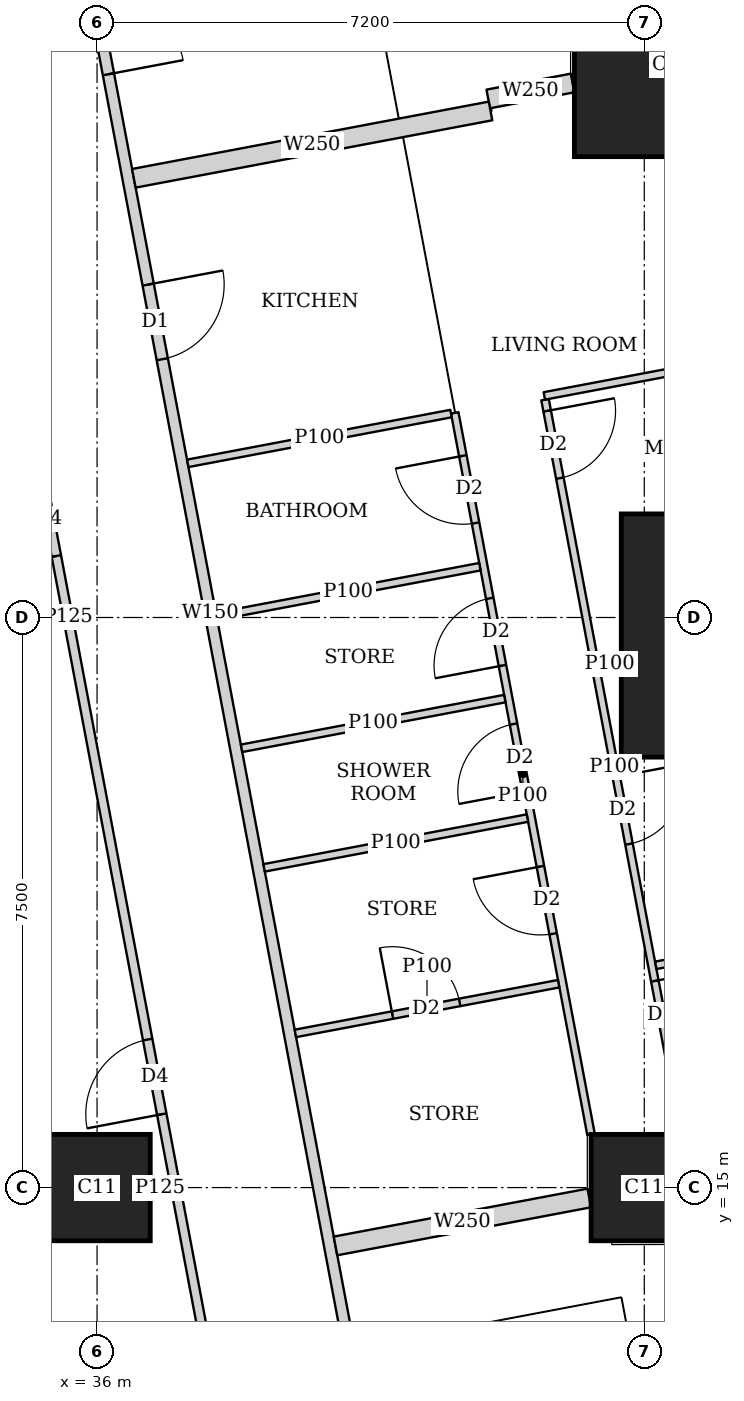
"""IFC4 building model, lengths in metres.
Left out: names, types, materials, properties, quantities, classifications, styles, units other than length and angle.
Written with IfcOpenShell. Run it as: python <this file> out.ifc"""

import sys

from ifc_helpers import new_model, si_unit, direction, frame, frame_2d, origin, origin_2d, place, context, subcontext, project, spatial, rectangle, extrude, element, fill, save


model = new_model("IFC4")
c1 = context("Model", 3, precision=1e-05, world=origin(), true_north=direction((0.0, 1.0)))
c2 = subcontext(c1, "Body", "Model", "MODEL_VIEW")
j1 = project(units=[si_unit("LENGTHUNIT", "METRE"), si_unit("PLANEANGLEUNIT", "RADIAN")], contexts=[c1])
p1 = place(None, origin())
s1 = spatial("IfcSite", under=j1, at=p1, CompositionType="ELEMENT")
p2 = place(p1, origin())
s2 = spatial("IfcBuilding", under=s1, at=p2, CompositionType="ELEMENT")
p3 = place(p2, frame((0.0, 0.0, 212.45)))
s3 = spatial("IfcBuildingStorey", under=s2, at=p3, CompositionType="ELEMENT", Elevation=212.45)
for number, where, z_axis, x_axis in (
    (1, (36.0, 15.0, 0.0), (0.0, 0.0, 1.0), (1.0, 0.0, 0.0)),
    (2, (43.2, 15.0, 0.0), (0.0, 0.0, 1.0), (1.0, 0.0, 0.0)),
):
    element("IfcColumn", number, at=place(p3, frame(where, z_axis=z_axis, x_axis=x_axis)), inside=s3, PredefinedType="COLUMN", context=c2, shape_type="SweptSolid", body=[
        extrude(rectangle(XDim=1.4, YDim=1.4, at=origin_2d()), origin(), (0.0, 0.0, 1.0), 3.75),
    ])
p4 = place(p3, frame((44.697, 22.263, 0.0), z_axis=(0.0, 0.0, 1.0), x_axis=(1.0, 0.0, 0.0)))
e3 = element("IfcColumn", 3, at=p4, inside=s3, PredefinedType="COLUMN", context=c2, shape_type="SweptSolid", body=[
    extrude(rectangle(XDim=3.6, YDim=3.2, at=origin_2d()), origin(), (0.0, 0.0, 1.0), 3.75),
])
p5 = place(p3, frame((43.48, 29.763, 0.0), z_axis=(0.0, 0.0, 1.0), x_axis=(1.0, 0.0, 0.0)))
e4 = element("IfcColumn", 4, at=p5, inside=s3, PredefinedType="COLUMN", context=c2, shape_type="SweptSolid", body=[
    extrude(rectangle(XDim=2.4, YDim=2.4, at=origin_2d()), origin(), (0.0, 0.0, 1.0), 3.75),
])
p6 = place(p3, frame((50.653, 2.703, 0.0), z_axis=(0.0, 0.0, 1.0), x_axis=(-0.185612026696, 0.982623109613, 0.0)))
e5 = element("IfcWall", 5, at=p6, inside=s3, PredefinedType="SOLIDWALL", context=c2, shape_type="SweptSolid", body=[
    extrude(rectangle(XDim=41.393, YDim=0.2, at=frame_2d((20.697, 0.0))), origin(), (0.0, 0.0, 1.0), 3.5),
])
p7 = place(p6, frame((1.633, 0.0, 0.9)))
e6 = element("IfcOpeningElement", 6, at=p7, cuts=e5, PredefinedType="OPENING", context=c2, shape_type="SweptSolid", body=[
    extrude(rectangle(XDim=1.8, YDim=1.5, at=frame_2d((0.9, 0.75))), frame((0.0, 0.11, 0.0), z_axis=(0.0, -1.0, 0.0), x_axis=(1.0, 0.0, 0.0)), (0.0, 0.0, 1.0), 0.22),
])
p8 = place(p6, frame((6.032, 0.0, 0.9)))
e7 = element("IfcOpeningElement", 7, at=p8, cuts=e5, PredefinedType="OPENING", context=c2, shape_type="SweptSolid", body=[
    extrude(rectangle(XDim=1.8, YDim=1.5, at=frame_2d((0.9, 0.75))), frame((0.0, 0.11, 0.0), z_axis=(0.0, -1.0, 0.0), x_axis=(1.0, 0.0, 0.0)), (0.0, 0.0, 1.0), 0.22),
])
p9 = place(p6, frame((9.848, 0.0, 0.9)))
e8 = element("IfcOpeningElement", 8, at=p9, cuts=e5, PredefinedType="OPENING", context=c2, shape_type="SweptSolid", body=[
    extrude(rectangle(XDim=1.8, YDim=1.5, at=frame_2d((0.9, 0.75))), frame((0.0, 0.11, 0.0), z_axis=(0.0, -1.0, 0.0), x_axis=(1.0, 0.0, 0.0)), (0.0, 0.0, 1.0), 0.22),
])
p10 = place(p6, frame((13.664, 0.0, 0.9)))
e9 = element("IfcOpeningElement", 9, at=p10, cuts=e5, PredefinedType="OPENING", context=c2, shape_type="SweptSolid", body=[
    extrude(rectangle(XDim=1.8, YDim=1.5, at=frame_2d((0.9, 0.75))), frame((0.0, 0.11, 0.0), z_axis=(0.0, -1.0, 0.0), x_axis=(1.0, 0.0, 0.0)), (0.0, 0.0, 1.0), 0.22),
])
p11 = place(p6, frame((17.481, 0.0, 0.9)))
e10 = element("IfcOpeningElement", 10, at=p11, cuts=e5, PredefinedType="OPENING", context=c2, shape_type="SweptSolid", body=[
    extrude(rectangle(XDim=1.8, YDim=1.5, at=frame_2d((0.9, 0.75))), frame((0.0, 0.11, 0.0), z_axis=(0.0, -1.0, 0.0), x_axis=(1.0, 0.0, 0.0)), (0.0, 0.0, 1.0), 0.22),
])
p12 = place(p6, frame((21.297, 0.0, 0.9)))
e11 = element("IfcOpeningElement", 11, at=p12, cuts=e5, PredefinedType="OPENING", context=c2, shape_type="SweptSolid", body=[
    extrude(rectangle(XDim=1.8, YDim=1.5, at=frame_2d((0.9, 0.75))), frame((0.0, 0.11, 0.0), z_axis=(0.0, -1.0, 0.0), x_axis=(1.0, 0.0, 0.0)), (0.0, 0.0, 1.0), 0.22),
])
p13 = place(p6, frame((25.113, 0.0, 0.9)))
e12 = element("IfcOpeningElement", 12, at=p13, cuts=e5, PredefinedType="OPENING", context=c2, shape_type="SweptSolid", body=[
    extrude(rectangle(XDim=1.8, YDim=1.5, at=frame_2d((0.9, 0.75))), frame((0.0, 0.11, 0.0), z_axis=(0.0, -1.0, 0.0), x_axis=(1.0, 0.0, 0.0)), (0.0, 0.0, 1.0), 0.22),
])
p14 = place(p6, frame((28.93, 0.0, 0.9)))
e13 = element("IfcOpeningElement", 13, at=p14, cuts=e5, PredefinedType="OPENING", context=c2, shape_type="SweptSolid", body=[
    extrude(rectangle(XDim=1.8, YDim=1.5, at=frame_2d((0.9, 0.75))), frame((0.0, 0.11, 0.0), z_axis=(0.0, -1.0, 0.0), x_axis=(1.0, 0.0, 0.0)), (0.0, 0.0, 1.0), 0.22),
])
p15 = place(p6, frame((32.746, 0.0, 0.9)))
e14 = element("IfcOpeningElement", 14, at=p15, cuts=e5, PredefinedType="OPENING", context=c2, shape_type="SweptSolid", body=[
    extrude(rectangle(XDim=1.8, YDim=1.5, at=frame_2d((0.9, 0.75))), frame((0.0, 0.11, 0.0), z_axis=(0.0, -1.0, 0.0), x_axis=(1.0, 0.0, 0.0)), (0.0, 0.0, 1.0), 0.22),
])
p16 = place(p6, frame((36.481, 0.0, 0.9)))
e15 = element("IfcOpeningElement", 15, at=p16, cuts=e5, PredefinedType="OPENING", context=c2, shape_type="SweptSolid", body=[
    extrude(rectangle(XDim=1.8, YDim=1.5, at=frame_2d((0.9, 0.75))), frame((0.0, 0.11, 0.0), z_axis=(0.0, -1.0, 0.0), x_axis=(1.0, 0.0, 0.0)), (0.0, 0.0, 1.0), 0.22),
])
p17 = place(p3, frame((33.68, 42.723, 0.0), z_axis=(0.0, 0.0, 1.0), x_axis=(0.185601160014, -0.982625162207, 0.0)))
e16 = element("IfcWall", 16, at=p17, inside=s3, PredefinedType="SOLIDWALL", context=c2, shape_type="SweptSolid", body=[
    extrude(rectangle(XDim=41.051, YDim=0.15, at=frame_2d((20.526, 0.0))), origin(), (0.0, 0.0, 1.0), 2.5),
])
p18 = place(p17, frame((12.307, 0.0, 0.0)))
e17 = element("IfcOpeningElement", 17, at=p18, cuts=e16, PredefinedType="OPENING", context=c2, shape_type="SweptSolid", body=[
    extrude(rectangle(XDim=1.0, YDim=2.1, at=frame_2d((0.5, 1.05))), frame((0.0, 0.085, 0.0), z_axis=(0.0, -1.0, 0.0), x_axis=(1.0, 0.0, 0.0)), (0.0, 0.0, 1.0), 0.17),
])
p19 = place(p17, frame((16.123, 0.0, 0.0)))
e18 = element("IfcOpeningElement", 18, at=p19, cuts=e16, PredefinedType="OPENING", context=c2, shape_type="SweptSolid", body=[
    extrude(rectangle(XDim=1.0, YDim=2.1, at=frame_2d((0.5, 1.05))), frame((0.0, 0.085, 0.0), z_axis=(0.0, -1.0, 0.0), x_axis=(1.0, 0.0, 0.0)), (0.0, 0.0, 1.0), 0.17),
])
p20 = place(p17, frame((30.902, 0.0, 0.0)))
e19 = element("IfcOpeningElement", 19, at=p20, cuts=e16, PredefinedType="OPENING", context=c2, shape_type="SweptSolid", body=[
    extrude(rectangle(XDim=1.0, YDim=2.1, at=frame_2d((0.5, 1.05))), frame((0.0, 0.085, 0.0), z_axis=(0.0, -1.0, 0.0), x_axis=(1.0, 0.0, 0.0)), (0.0, 0.0, 1.0), 0.17),
])
p21 = place(p3, frame((41.894, 25.366, 0.0), z_axis=(0.0, 0.0, 1.0), x_axis=(0.185612905165, -0.982622943675, 0.0)))
e20 = element("IfcWall", 20, at=p21, inside=s3, PredefinedType="PARTITIONING", context=c2, shape_type="SweptSolid", body=[
    extrude(rectangle(XDim=9.827, YDim=0.1, at=frame_2d((4.913, 0.0))), origin(), (0.0, 0.0, 1.0), 2.5),
])
p22 = place(p21, frame((0.151, 0.0, 0.0)))
e21 = element("IfcOpeningElement", 21, at=p22, cuts=e20, PredefinedType="OPENING", context=c2, shape_type="SweptSolid", body=[
    extrude(rectangle(XDim=0.9, YDim=2.1, at=frame_2d((0.45, 1.05))), frame((0.0, 0.06, 0.0), z_axis=(0.0, -1.0, 0.0), x_axis=(1.0, 0.0, 0.0)), (0.0, 0.0, 1.0), 0.12),
])
p23 = place(p21, frame((5.05, 0.0, 0.0)))
e22 = element("IfcOpeningElement", 22, at=p23, cuts=e20, PredefinedType="OPENING", context=c2, shape_type="SweptSolid", body=[
    extrude(rectangle(XDim=0.9, YDim=2.1, at=frame_2d((0.45, 1.05))), frame((0.0, 0.06, 0.0), z_axis=(0.0, -1.0, 0.0), x_axis=(1.0, 0.0, 0.0)), (0.0, 0.0, 1.0), 0.12),
])
p24 = place(p21, frame((7.783, 0.0, 0.0)))
e23 = element("IfcOpeningElement", 23, at=p24, cuts=e20, PredefinedType="OPENING", context=c2, shape_type="SweptSolid", body=[
    extrude(rectangle(XDim=0.9, YDim=2.1, at=frame_2d((0.45, 1.05))), frame((0.0, 0.06, 0.0), z_axis=(0.0, -1.0, 0.0), x_axis=(1.0, 0.0, 0.0)), (0.0, 0.0, 1.0), 0.12),
])
p25 = place(p3, frame((40.706, 25.192, 0.0), z_axis=(0.0, 0.0, 1.0), x_axis=(0.185629824463, -0.982619747547, 0.0)))
e24 = element("IfcWall", 24, at=p25, inside=s3, PredefinedType="PARTITIONING", context=c2, shape_type="SweptSolid", body=[
    extrude(rectangle(XDim=9.659, YDim=0.1, at=frame_2d((4.83, 0.0))), origin(), (0.0, 0.0, 1.0), 2.5),
])
p26 = place(p25, frame((0.575, 0.0, 0.0)))
e25 = element("IfcOpeningElement", 25, at=p26, cuts=e24, PredefinedType="OPENING", context=c2, shape_type="SweptSolid", body=[
    extrude(rectangle(XDim=0.9, YDim=2.1, at=frame_2d((0.45, 1.05))), frame((0.0, 0.06, 0.0), z_axis=(0.0, -1.0, 0.0), x_axis=(1.0, 0.0, 0.0)), (0.0, 0.0, 1.0), 0.12),
])
p27 = place(p25, frame((4.166, 0.0, 0.0)))
e26 = element("IfcOpeningElement", 26, at=p27, cuts=e24, PredefinedType="OPENING", context=c2, shape_type="SweptSolid", body=[
    extrude(rectangle(XDim=0.9, YDim=2.1, at=frame_2d((0.45, 1.05))), frame((0.0, 0.06, 0.0), z_axis=(0.0, -1.0, 0.0), x_axis=(1.0, 0.0, 0.0)), (0.0, 0.0, 1.0), 0.12),
])
p28 = place(p25, frame((2.483, 0.0, 0.0)))
e27 = element("IfcOpeningElement", 27, at=p28, cuts=e24, PredefinedType="OPENING", context=c2, shape_type="SweptSolid", body=[
    extrude(rectangle(XDim=0.9, YDim=2.1, at=frame_2d((0.45, 1.05))), frame((0.0, 0.06, 0.0), z_axis=(0.0, -1.0, 0.0), x_axis=(1.0, 0.0, 0.0)), (0.0, 0.0, 1.0), 0.12),
])
p29 = place(p25, frame((6.074, 0.0, 0.0)))
e28 = element("IfcOpeningElement", 28, at=p29, cuts=e24, PredefinedType="OPENING", context=c2, shape_type="SweptSolid", body=[
    extrude(rectangle(XDim=0.9, YDim=2.1, at=frame_2d((0.45, 1.05))), frame((0.0, 0.06, 0.0), z_axis=(0.0, -1.0, 0.0), x_axis=(1.0, 0.0, 0.0)), (0.0, 0.0, 1.0), 0.12),
])
p30 = place(p3, frame((46.11, 26.213, 0.0), z_axis=(0.0, 0.0, 1.0), x_axis=(-0.982633535512, -0.185556823879, 0.0)))
e29 = element("IfcWall", 29, at=p30, inside=s3, PredefinedType="PARTITIONING", context=c2, shape_type="SweptSolid", body=[
    extrude(rectangle(XDim=4.3, YDim=0.1, at=frame_2d((2.15, 0.0))), origin(), (0.0, 0.0, 1.0), 2.05),
])
p31 = place(p3, frame((42.887, 21.921, 0.0), z_axis=(0.0, 0.0, 1.0), x_axis=(-0.982688058078, -0.185267861514, 0.0)))
e30 = element("IfcWall", 30, at=p31, inside=s3, PredefinedType="PARTITIONING", context=c2, shape_type="SweptSolid", body=[
    extrude(rectangle(XDim=0.286, YDim=0.1, at=frame_2d((0.143, 0.0))), origin(), (0.0, 0.0, 1.0), 2.5),
])
p32 = place(p3, frame((47.527, 18.712, 0.0), z_axis=(0.0, 0.0, 1.0), x_axis=(-0.982665405803, -0.185387972203, 0.0)))
e31 = element("IfcWall", 31, at=p32, inside=s3, PredefinedType="PARTITIONING", context=c2, shape_type="SweptSolid", body=[
    extrude(rectangle(XDim=4.25, YDim=0.1, at=frame_2d((2.125, 0.0))), origin(), (0.0, 0.0, 1.0), 2.05),
])
p33 = place(p3, frame((40.657, 25.183, 0.0), z_axis=(0.0, 0.0, 1.0), x_axis=(-0.982585626838, -0.185810349366, 0.0)))
e32 = element("IfcWall", 32, at=p33, inside=s3, PredefinedType="PARTITIONING", context=c2, shape_type="SweptSolid", body=[
    extrude(rectangle(XDim=3.525, YDim=0.1, at=frame_2d((1.763, 0.0))), origin(), (0.0, 0.0, 1.0), 3.5),
])
p34 = place(p3, frame((41.365, 21.433, 0.0), z_axis=(0.0, 0.0, 1.0), x_axis=(-0.982638553676, -0.185530247748, 0.0)))
e33 = element("IfcWall", 33, at=p34, inside=s3, PredefinedType="PARTITIONING", context=c2, shape_type="SweptSolid", body=[
    extrude(rectangle(XDim=3.525, YDim=0.1, at=frame_2d((1.763, 0.0))), origin(), (0.0, 0.0, 1.0), 3.5),
])
p35 = place(p3, frame((42.073, 17.682, 0.0), z_axis=(0.0, 0.0, 1.0), x_axis=(-0.98265117712, -0.185463376723, 0.0)))
e34 = element("IfcWall", 34, at=p35, inside=s3, PredefinedType="PARTITIONING", context=c2, shape_type="SweptSolid", body=[
    extrude(rectangle(XDim=3.525, YDim=0.1, at=frame_2d((1.763, 0.0))), origin(), (0.0, 0.0, 1.0), 3.5),
])
p36 = place(p35, frame((1.325, 0.0, 0.0)))
e35 = element("IfcOpeningElement", 35, at=p36, cuts=e34, PredefinedType="OPENING", context=c2, shape_type="SweptSolid", body=[
    extrude(rectangle(XDim=0.9, YDim=2.1, at=frame_2d((0.45, 1.05))), frame((0.0, 0.06, 0.0), z_axis=(0.0, -1.0, 0.0), x_axis=(1.0, 0.0, 0.0)), (0.0, 0.0, 1.0), 0.12),
])
p37 = place(p3, frame((41.037, 23.168, 0.0), z_axis=(0.0, 0.0, 1.0), x_axis=(-0.982638553676, -0.185530247748, 0.0)))
e36 = element("IfcWall", 36, at=p37, inside=s3, PredefinedType="PARTITIONING", context=c2, shape_type="SweptSolid", body=[
    extrude(rectangle(XDim=3.525, YDim=0.1, at=frame_2d((1.763, 0.0))), origin(), (0.0, 0.0, 1.0), 2.5),
])
p38 = place(p3, frame((41.662, 19.861, 0.0), z_axis=(0.0, 0.0, 1.0), x_axis=(-0.982588017646, -0.185797706064, 0.0)))
e37 = element("IfcWall", 37, at=p38, inside=s3, PredefinedType="PARTITIONING", context=c2, shape_type="SweptSolid", body=[
    extrude(rectangle(XDim=3.525, YDim=0.1, at=frame_2d((1.763, 0.0))), origin(), (0.0, 0.0, 1.0), 3.5),
])
p39 = place(p3, frame((42.256, 29.532, 0.0), z_axis=(0.0, 0.0, 1.0), x_axis=(-0.982549954272, -0.185998890749, 0.0)))
e38 = element("IfcWall", 38, at=p39, inside=s3, PredefinedType="SOLIDWALL", context=c2, shape_type="SweptSolid", body=[
    extrude(rectangle(XDim=1.129, YDim=0.25, at=frame_2d((0.564, 0.0))), origin(), (0.0, 0.0, 1.0), 2.05),
])
p40 = place(p3, frame((41.177, 29.164, 0.0), z_axis=(0.0, 0.0, 1.0), x_axis=(-0.982642846239, -0.185507511263, 0.0)))
e39 = element("IfcWall", 39, at=p40, inside=s3, PredefinedType="SOLIDWALL", context=c2, shape_type="SweptSolid", body=[
    extrude(rectangle(XDim=4.776, YDim=0.25, at=frame_2d((2.388, 0.0))), origin(), (0.0, 0.0, 1.0), 2.5),
])
p41 = place(p3, frame((42.476, 14.863, 0.0), z_axis=(0.0, 0.0, 1.0), x_axis=(-0.982603567712, -0.185715450942, 0.0)))
e40 = element("IfcWall", 40, at=p41, inside=s3, PredefinedType="SOLIDWALL", context=c2, shape_type="SweptSolid", body=[
    extrude(rectangle(XDim=3.398, YDim=0.25, at=frame_2d((1.699, 0.0))), origin(), (0.0, 0.0, 1.0), 3.5),
])
p42 = place(p3, frame((37.9, 10.413, 0.0), z_axis=(0.0, 0.0, 1.0), x_axis=(-0.185589740669, 0.982627319058, 0.0)))
e41 = element("IfcWall", 41, at=p42, inside=s3, PredefinedType="PARTITIONING", context=c2, shape_type="SweptSolid", body=[
    extrude(rectangle(XDim=24.602, YDim=0.125, at=frame_2d((12.301, 0.0))), origin(), (0.0, 0.0, 1.0), 2.5),
])
p43 = place(p42, frame((0.708, 0.0, 0.0)))
e42 = element("IfcOpeningElement", 42, at=p43, cuts=e41, PredefinedType="OPENING", context=c2, shape_type="SweptSolid", body=[
    extrude(rectangle(XDim=1.0, YDim=2.1, at=frame_2d((0.5, 1.05))), frame((0.0, 0.073, 0.0), z_axis=(0.0, -1.0, 0.0), x_axis=(1.0, 0.0, 0.0)), (0.0, 0.0, 1.0), 0.145),
])
p44 = place(p42, frame((5.65, 0.0, 0.0)))
e43 = element("IfcOpeningElement", 43, at=p44, cuts=e41, PredefinedType="OPENING", context=c2, shape_type="SweptSolid", body=[
    extrude(rectangle(XDim=1.0, YDim=2.1, at=frame_2d((0.5, 1.05))), frame((0.0, 0.073, 0.0), z_axis=(0.0, -1.0, 0.0), x_axis=(1.0, 0.0, 0.0)), (0.0, 0.0, 1.0), 0.145),
])
p45 = place(p42, frame((13.124, 0.0, 0.0)))
e44 = element("IfcOpeningElement", 44, at=p45, cuts=e41, PredefinedType="OPENING", context=c2, shape_type="SweptSolid", body=[
    extrude(rectangle(XDim=1.0, YDim=2.1, at=frame_2d((0.5, 1.05))), frame((0.0, 0.073, 0.0), z_axis=(0.0, -1.0, 0.0), x_axis=(1.0, 0.0, 0.0)), (0.0, 0.0, 1.0), 0.145),
])
p46 = place(p42, frame((16.94, 0.0, 0.0)))
e45 = element("IfcOpeningElement", 45, at=p46, cuts=e41, PredefinedType="OPENING", context=c2, shape_type="SweptSolid", body=[
    extrude(rectangle(XDim=1.0, YDim=2.1, at=frame_2d((0.5, 1.05))), frame((0.0, 0.073, 0.0), z_axis=(0.0, -1.0, 0.0), x_axis=(1.0, 0.0, 0.0)), (0.0, 0.0, 1.0), 0.145),
])
p47 = place(p42, frame((20.9, 0.0, 0.0)))
e46 = element("IfcOpeningElement", 46, at=p47, cuts=e41, PredefinedType="OPENING", context=c2, shape_type="SweptSolid", body=[
    extrude(rectangle(XDim=1.0, YDim=2.1, at=frame_2d((0.5, 1.05))), frame((0.0, 0.073, 0.0), z_axis=(0.0, -1.0, 0.0), x_axis=(1.0, 0.0, 0.0)), (0.0, 0.0, 1.0), 0.145),
])
p48 = place(p3, frame((36.701, 15.0, 0.0), z_axis=(0.0, 0.0, 1.0), x_axis=(1.0, 0.0, 0.0)))
e47 = element("IfcWall", 47, at=p48, inside=s3, PredefinedType="PARTITIONING", context=c2, shape_type="SweptSolid", body=[
    extrude(rectangle(XDim=0.257, YDim=0.125, at=frame_2d((0.128, 0.0))), origin(), (0.0, 0.0, 1.0), 3.5),
])
p49 = place(p3, frame((33.701, 22.5, 0.0), z_axis=(0.0, 0.0, 1.0), x_axis=(1.0, 0.0, 0.0)))
e48 = element("IfcWall", 48, at=p49, inside=s3, PredefinedType="PARTITIONING", context=c2, shape_type="SweptSolid", body=[
    extrude(rectangle(XDim=1.841, YDim=0.125, at=frame_2d((0.92, 0.0))), origin(), (0.0, 0.0, 1.0), 2.5),
])
p50 = place(p18, origin())
e49 = element("IfcDoor", 49, at=p50, inside=s3, OperationType="SINGLE_SWING_RIGHT", PredefinedType="DOOR", context=c2, shape_type="SweptSolid", body=[
    extrude(rectangle(XDim=1.0, YDim=2.1, at=frame_2d((0.5, 1.05))), frame((0.0, 0.025, 0.0), z_axis=(0.0, -1.0, 0.0), x_axis=(1.0, 0.0, 0.0)), (0.0, 0.0, 1.0), 0.05),
])
fill(e17, e49)
p51 = place(p22, origin())
e50 = element("IfcDoor", 50, at=p51, inside=s3, OperationType="SINGLE_SWING_LEFT", PredefinedType="DOOR", context=c2, shape_type="SweptSolid", body=[
    extrude(rectangle(XDim=0.9, YDim=2.1, at=frame_2d((0.45, 1.05))), frame((0.0, 0.025, 0.0), z_axis=(0.0, -1.0, 0.0), x_axis=(1.0, 0.0, 0.0)), (0.0, 0.0, 1.0), 0.05),
])
fill(e21, e50)
p52 = place(p23, origin())
e51 = element("IfcDoor", 51, at=p52, inside=s3, OperationType="SINGLE_SWING_LEFT", PredefinedType="DOOR", context=c2, shape_type="SweptSolid", body=[
    extrude(rectangle(XDim=0.9, YDim=2.1, at=frame_2d((0.45, 1.05))), frame((0.0, 0.025, 0.0), z_axis=(0.0, -1.0, 0.0), x_axis=(1.0, 0.0, 0.0)), (0.0, 0.0, 1.0), 0.05),
])
fill(e22, e51)
p53 = place(p24, origin())
e52 = element("IfcDoor", 52, at=p53, inside=s3, OperationType="SINGLE_SWING_LEFT", PredefinedType="DOOR", context=c2, shape_type="SweptSolid", body=[
    extrude(rectangle(XDim=0.9, YDim=2.1, at=frame_2d((0.45, 1.05))), frame((0.0, 0.025, 0.0), z_axis=(0.0, -1.0, 0.0), x_axis=(1.0, 0.0, 0.0)), (0.0, 0.0, 1.0), 0.05),
])
fill(e23, e52)
p54 = place(p26, origin())
e53 = element("IfcDoor", 53, at=p54, inside=s3, OperationType="SINGLE_SWING_RIGHT", PredefinedType="DOOR", context=c2, shape_type="SweptSolid", body=[
    extrude(rectangle(XDim=0.9, YDim=2.1, at=frame_2d((0.45, 1.05))), frame((0.0, 0.025, 0.0), z_axis=(0.0, -1.0, 0.0), x_axis=(1.0, 0.0, 0.0)), (0.0, 0.0, 1.0), 0.05),
])
fill(e25, e53)
p55 = place(p27, origin())
e54 = element("IfcDoor", 54, at=p55, inside=s3, OperationType="SINGLE_SWING_LEFT", PredefinedType="DOOR", context=c2, shape_type="SweptSolid", body=[
    extrude(rectangle(XDim=0.9, YDim=2.1, at=frame_2d((0.45, 1.05))), frame((0.0, 0.025, 0.0), z_axis=(0.0, -1.0, 0.0), x_axis=(1.0, 0.0, 0.0)), (0.0, 0.0, 1.0), 0.05),
])
fill(e26, e54)
p56 = place(p28, origin())
e55 = element("IfcDoor", 55, at=p56, inside=s3, OperationType="SINGLE_SWING_LEFT", PredefinedType="DOOR", context=c2, shape_type="SweptSolid", body=[
    extrude(rectangle(XDim=0.9, YDim=2.1, at=frame_2d((0.45, 1.05))), frame((0.0, 0.025, 0.0), z_axis=(0.0, -1.0, 0.0), x_axis=(1.0, 0.0, 0.0)), (0.0, 0.0, 1.0), 0.05),
])
fill(e27, e55)
p57 = place(p29, origin())
e56 = element("IfcDoor", 56, at=p57, inside=s3, OperationType="SINGLE_SWING_RIGHT", PredefinedType="DOOR", context=c2, shape_type="SweptSolid", body=[
    extrude(rectangle(XDim=0.9, YDim=2.1, at=frame_2d((0.45, 1.05))), frame((0.0, 0.025, 0.0), z_axis=(0.0, -1.0, 0.0), x_axis=(1.0, 0.0, 0.0)), (0.0, 0.0, 1.0), 0.05),
])
fill(e28, e56)
p58 = place(p19, origin())
e57 = element("IfcDoor", 57, at=p58, inside=s3, OperationType="SINGLE_SWING_LEFT", PredefinedType="DOOR", context=c2, shape_type="SweptSolid", body=[
    extrude(rectangle(XDim=1.0, YDim=2.1, at=frame_2d((0.5, 1.05))), frame((0.0, 0.025, 0.0), z_axis=(0.0, -1.0, 0.0), x_axis=(1.0, 0.0, 0.0)), (0.0, 0.0, 1.0), 0.05),
])
fill(e18, e57)
p59 = place(p36, origin())
e58 = element("IfcDoor", 58, at=p59, inside=s3, OperationType="SINGLE_SWING_LEFT", PredefinedType="DOOR", context=c2, shape_type="SweptSolid", body=[
    extrude(rectangle(XDim=0.9, YDim=2.1, at=frame_2d((0.45, 1.05))), frame((0.0, 0.025, 0.0), z_axis=(0.0, -1.0, 0.0), x_axis=(1.0, 0.0, 0.0)), (0.0, 0.0, 1.0), 0.05),
])
fill(e35, e58)
p60 = place(p44, origin())
e59 = element("IfcDoor", 59, at=p60, inside=s3, OperationType="SINGLE_SWING_LEFT", PredefinedType="DOOR", context=c2, shape_type="SweptSolid", body=[
    extrude(rectangle(XDim=1.0, YDim=2.1, at=frame_2d((0.5, 1.05))), frame((0.0, 0.025, 0.0), z_axis=(0.0, -1.0, 0.0), x_axis=(1.0, 0.0, 0.0)), (0.0, 0.0, 1.0), 0.05),
])
fill(e43, e59)
p61 = place(p45, origin())
e60 = element("IfcDoor", 60, at=p61, inside=s3, OperationType="SINGLE_SWING_LEFT", PredefinedType="DOOR", context=c2, shape_type="SweptSolid", body=[
    extrude(rectangle(XDim=1.0, YDim=2.1, at=frame_2d((0.5, 1.05))), frame((0.0, 0.025, 0.0), z_axis=(0.0, -1.0, 0.0), x_axis=(1.0, 0.0, 0.0)), (0.0, 0.0, 1.0), 0.05),
])
fill(e44, e60)
save(model, sys.argv[1])
